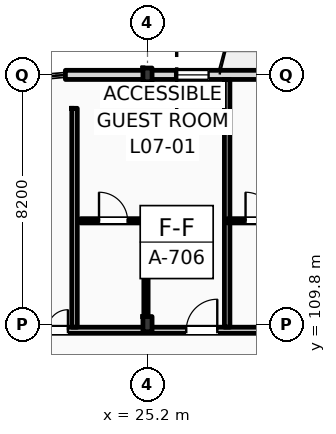
"""IFC4 building model, lengths in metres.
Left out: names, types, materials, properties, quantities, classifications, styles, units other than length and angle.
Written with IfcOpenShell. Run it as: python <this file> out.ifc"""

import sys

from ifc_helpers import new_model, si_unit, direction, frame, frame_2d, origin, origin_2d, place, context, subcontext, project, spatial, rectangle, i_section, extrude, element, fill, save


model = new_model("IFC4")
c1 = context("Model", 3, precision=1e-05, world=origin(), true_north=direction((0.0, 1.0)))
c2 = subcontext(c1, "Body", "Model", "MODEL_VIEW")
j1 = project(units=[si_unit("LENGTHUNIT", "METRE"), si_unit("PLANEANGLEUNIT", "RADIAN")], contexts=[c1])
p1 = place(None, origin())
s1 = spatial("IfcSite", under=j1, at=p1, CompositionType="ELEMENT")
p2 = place(p1, origin())
s2 = spatial("IfcBuilding", under=s1, at=p2, CompositionType="ELEMENT")
p3 = place(p2, frame((0.0, 0.0, 31.8)))
s3 = spatial("IfcBuildingStorey", under=s2, at=p3, CompositionType="ELEMENT", Elevation=31.8)
p4 = place(p3, frame((25.2, 109.8, 0.0), z_axis=(0.0, 0.0, 1.0), x_axis=(1.0, 0.0, 0.0)))
e1 = element("IfcColumn", 1, at=p4, inside=s3, PredefinedType="COLUMN", context=c2, shape_type="SweptSolid", body=[
    extrude(i_section(OverallWidth=0.3, OverallDepth=0.5, WebThickness=0.014, FlangeThickness=0.028, FilletRadius=0.027, at=origin_2d()), origin(), (0.0, 0.0, 1.0), 3.6),
])
p5 = place(p3, frame((25.2, 118.0, 0.0), z_axis=(0.0, 0.0, 1.0), x_axis=(1.0, 0.0, 0.0)))
e2 = element("IfcColumn", 2, at=p5, inside=s3, PredefinedType="COLUMN", context=c2, shape_type="SweptSolid", body=[
    extrude(i_section(OverallWidth=0.3, OverallDepth=0.45, WebThickness=0.014, FlangeThickness=0.026, FilletRadius=0.027, at=origin_2d()), origin(), (0.0, 0.0, 1.0), 3.6),
])
p6 = place(p3, frame((22.5, 118.0, 0.0), z_axis=(0.0, 0.0, 1.0), x_axis=(1.0, 0.0, 0.0)))
e3 = element("IfcWall", 3, at=p6, inside=s3, PredefinedType="STANDARD", context=c2, shape_type="SweptSolid", body=[
    extrude(rectangle(XDim=97.5, YDim=0.3, at=frame_2d((48.75, 0.0))), origin(), (0.0, 0.0, 1.0), 2.72),
])
p7 = place(p6, frame((3.61, 0.0, 0.9)))
e4 = element("IfcOpeningElement", 4, at=p7, cuts=e3, PredefinedType="OPENING", context=c2, shape_type="SweptSolid", body=[
    extrude(rectangle(XDim=1.1, YDim=1.64, at=frame_2d((0.55, 0.82))), frame((0.0, 0.16, 0.0), z_axis=(0.0, -1.0, 0.0), x_axis=(1.0, 0.0, 0.0)), (0.0, 0.0, 1.0), 0.32),
])
p8 = place(p6, frame((6.855, 0.0, 0.0)))
e5 = element("IfcOpeningElement", 5, at=p8, cuts=e3, PredefinedType="OPENING", context=c2, shape_type="SweptSolid", body=[
    extrude(rectangle(XDim=1.2, YDim=2.25, at=frame_2d((0.6, 1.125))), frame((0.0, 0.16, 0.0), z_axis=(0.0, -1.0, 0.0), x_axis=(1.0, 0.0, 0.0)), (0.0, 0.0, 1.0), 0.32),
])
p9 = place(p6, frame((11.405, 0.0, 0.9)))
e6 = element("IfcOpeningElement", 6, at=p9, cuts=e3, PredefinedType="OPENING", context=c2, shape_type="SweptSolid", body=[
    extrude(rectangle(XDim=2.1, YDim=1.64, at=frame_2d((1.05, 0.82))), frame((0.0, 0.16, 0.0), z_axis=(0.0, -1.0, 0.0), x_axis=(1.0, 0.0, 0.0)), (0.0, 0.0, 1.0), 0.32),
])
p10 = place(p6, frame((15.13, 0.0, 0.9)))
e7 = element("IfcOpeningElement", 7, at=p10, cuts=e3, PredefinedType="OPENING", context=c2, shape_type="SweptSolid", body=[
    extrude(rectangle(XDim=2.25, YDim=1.64, at=frame_2d((1.125, 0.82))), frame((0.0, 0.16, 0.0), z_axis=(0.0, -1.0, 0.0), x_axis=(1.0, 0.0, 0.0)), (0.0, 0.0, 1.0), 0.32),
])
p11 = place(p6, frame((21.53, 0.0, 0.0)))
e8 = element("IfcOpeningElement", 8, at=p11, cuts=e3, PredefinedType="OPENING", context=c2, shape_type="SweptSolid", body=[
    extrude(rectangle(XDim=1.2, YDim=2.25, at=frame_2d((0.6, 1.125))), frame((0.0, 0.16, 0.0), z_axis=(0.0, -1.0, 0.0), x_axis=(1.0, 0.0, 0.0)), (0.0, 0.0, 1.0), 0.32),
])
p12 = place(p6, frame((24.18, 0.0, 0.9)))
e9 = element("IfcOpeningElement", 9, at=p12, cuts=e3, PredefinedType="OPENING", context=c2, shape_type="SweptSolid", body=[
    extrude(rectangle(XDim=1.1, YDim=1.64, at=frame_2d((0.55, 0.82))), frame((0.0, 0.16, 0.0), z_axis=(0.0, -1.0, 0.0), x_axis=(1.0, 0.0, 0.0)), (0.0, 0.0, 1.0), 0.32),
])
p13 = place(p6, frame((29.105, 0.0, 0.9)))
e10 = element("IfcOpeningElement", 10, at=p13, cuts=e3, PredefinedType="OPENING", context=c2, shape_type="SweptSolid", body=[
    extrude(rectangle(XDim=2.7, YDim=1.64, at=frame_2d((1.35, 0.82))), frame((0.0, 0.16, 0.0), z_axis=(0.0, -1.0, 0.0), x_axis=(1.0, 0.0, 0.0)), (0.0, 0.0, 1.0), 0.32),
])
p14 = place(p6, frame((34.83, 0.0, 0.9)))
e11 = element("IfcOpeningElement", 11, at=p14, cuts=e3, PredefinedType="OPENING", context=c2, shape_type="SweptSolid", body=[
    extrude(rectangle(XDim=1.8, YDim=1.64, at=frame_2d((0.9, 0.82))), frame((0.0, 0.16, 0.0), z_axis=(0.0, -1.0, 0.0), x_axis=(1.0, 0.0, 0.0)), (0.0, 0.0, 1.0), 0.32),
])
p15 = place(p6, frame((38.525, 0.0, 0.0)))
e12 = element("IfcOpeningElement", 12, at=p15, cuts=e3, PredefinedType="OPENING", context=c2, shape_type="SweptSolid", body=[
    extrude(rectangle(XDim=1.2, YDim=2.25, at=frame_2d((0.6, 1.125))), frame((0.0, 0.16, 0.0), z_axis=(0.0, -1.0, 0.0), x_axis=(1.0, 0.0, 0.0)), (0.0, 0.0, 1.0), 0.32),
])
p16 = place(p6, frame((42.73, 0.0, 0.9)))
e13 = element("IfcOpeningElement", 13, at=p16, cuts=e3, PredefinedType="OPENING", context=c2, shape_type="SweptSolid", body=[
    extrude(rectangle(XDim=3.05, YDim=1.64, at=frame_2d((1.525, 0.82))), frame((0.0, 0.16, 0.0), z_axis=(0.0, -1.0, 0.0), x_axis=(1.0, 0.0, 0.0)), (0.0, 0.0, 1.0), 0.32),
])
p17 = place(p6, frame((47.155, 0.0, 0.9)))
e14 = element("IfcOpeningElement", 14, at=p17, cuts=e3, PredefinedType="OPENING", context=c2, shape_type="SweptSolid", body=[
    extrude(rectangle(XDim=1.35, YDim=1.64, at=frame_2d((0.675, 0.82))), frame((0.0, 0.16, 0.0), z_axis=(0.0, -1.0, 0.0), x_axis=(1.0, 0.0, 0.0)), (0.0, 0.0, 1.0), 0.32),
])
p18 = place(p6, frame((53.065, 0.0, 0.0)))
e15 = element("IfcOpeningElement", 15, at=p18, cuts=e3, PredefinedType="OPENING", context=c2, shape_type="SweptSolid", body=[
    extrude(rectangle(XDim=1.2, YDim=2.25, at=frame_2d((0.6, 1.125))), frame((0.0, 0.16, 0.0), z_axis=(0.0, -1.0, 0.0), x_axis=(1.0, 0.0, 0.0)), (0.0, 0.0, 1.0), 0.32),
])
p19 = place(p6, frame((58.2, 0.0, 0.9)))
e16 = element("IfcOpeningElement", 16, at=p19, cuts=e3, PredefinedType="OPENING", context=c2, shape_type="SweptSolid", body=[
    extrude(rectangle(XDim=1.8, YDim=1.64, at=frame_2d((0.9, 0.82))), frame((0.0, 0.16, 0.0), z_axis=(0.0, -1.0, 0.0), x_axis=(1.0, 0.0, 0.0)), (0.0, 0.0, 1.0), 0.32),
])
p20 = place(p6, frame((61.13, 0.0, 0.9)))
e17 = element("IfcOpeningElement", 17, at=p20, cuts=e3, PredefinedType="OPENING", context=c2, shape_type="SweptSolid", body=[
    extrude(rectangle(XDim=3.05, YDim=1.64, at=frame_2d((1.525, 0.82))), frame((0.0, 0.16, 0.0), z_axis=(0.0, -1.0, 0.0), x_axis=(1.0, 0.0, 0.0)), (0.0, 0.0, 1.0), 0.32),
])
p21 = place(p6, frame((67.93, 0.0, 0.0)))
e18 = element("IfcOpeningElement", 18, at=p21, cuts=e3, PredefinedType="OPENING", context=c2, shape_type="SweptSolid", body=[
    extrude(rectangle(XDim=1.2, YDim=2.25, at=frame_2d((0.6, 1.125))), frame((0.0, 0.16, 0.0), z_axis=(0.0, -1.0, 0.0), x_axis=(1.0, 0.0, 0.0)), (0.0, 0.0, 1.0), 0.32),
])
p22 = place(p6, frame((70.39, 0.0, 0.0)))
e19 = element("IfcOpeningElement", 19, at=p22, cuts=e3, PredefinedType="OPENING", context=c2, shape_type="SweptSolid", body=[
    extrude(rectangle(XDim=1.2, YDim=2.25, at=frame_2d((0.6, 1.125))), frame((0.0, 0.16, 0.0), z_axis=(0.0, -1.0, 0.0), x_axis=(1.0, 0.0, 0.0)), (0.0, 0.0, 1.0), 0.32),
])
p23 = place(p6, frame((75.905, 0.0, 0.9)))
e20 = element("IfcOpeningElement", 20, at=p23, cuts=e3, PredefinedType="OPENING", context=c2, shape_type="SweptSolid", body=[
    extrude(rectangle(XDim=1.1, YDim=1.5, at=frame_2d((0.55, 0.75))), frame((0.0, 0.16, 0.0), z_axis=(0.0, -1.0, 0.0), x_axis=(1.0, 0.0, 0.0)), (0.0, 0.0, 1.0), 0.32),
])
p24 = place(p6, frame((81.63, 0.0, 0.9)))
e21 = element("IfcOpeningElement", 21, at=p24, cuts=e3, PredefinedType="OPENING", context=c2, shape_type="SweptSolid", body=[
    extrude(rectangle(XDim=1.1, YDim=1.6, at=frame_2d((0.55, 0.8))), frame((0.0, 0.16, 0.0), z_axis=(0.0, -1.0, 0.0), x_axis=(1.0, 0.0, 0.0)), (0.0, 0.0, 1.0), 0.32),
])
p25 = place(p6, frame((84.955, 0.0, 0.9)))
e22 = element("IfcOpeningElement", 22, at=p25, cuts=e3, PredefinedType="OPENING", context=c2, shape_type="SweptSolid", body=[
    extrude(rectangle(XDim=1.4, YDim=1.64, at=frame_2d((0.7, 0.82))), frame((0.0, 0.16, 0.0), z_axis=(0.0, -1.0, 0.0), x_axis=(1.0, 0.0, 0.0)), (0.0, 0.0, 1.0), 0.32),
])
p26 = place(p6, frame((90.055, 0.0, 0.9)))
e23 = element("IfcOpeningElement", 23, at=p26, cuts=e3, PredefinedType="OPENING", context=c2, shape_type="SweptSolid", body=[
    extrude(rectangle(XDim=1.6, YDim=1.64, at=frame_2d((0.8, 0.82))), frame((0.0, 0.16, 0.0), z_axis=(0.0, -1.0, 0.0), x_axis=(1.0, 0.0, 0.0)), (0.0, 0.0, 1.0), 0.32),
])
p27 = place(p6, frame((93.87, 0.0, 0.9)))
e24 = element("IfcOpeningElement", 24, at=p27, cuts=e3, PredefinedType="OPENING", context=c2, shape_type="SweptSolid", body=[
    extrude(rectangle(XDim=1.75, YDim=1.64, at=frame_2d((0.875, 0.82))), frame((0.0, 0.16, 0.0), z_axis=(0.0, -1.0, 0.0), x_axis=(1.0, 0.0, 0.0)), (0.0, 0.0, 1.0), 0.32),
])
p28 = place(p3, frame((10.65, 109.6, 0.0), z_axis=(0.0, 0.0, 1.0), x_axis=(1.0, 0.0, 0.0)))
e25 = element("IfcWall", 25, at=p28, inside=s3, PredefinedType="PARTITIONING", context=c2, shape_type="SweptSolid", body=[
    extrude(rectangle(XDim=109.21, YDim=0.2, at=frame_2d((54.605, 0.0))), origin(), (0.0, 0.0, 1.0), 2.72),
])
p29 = place(p28, frame((15.825, 0.0, 0.0)))
e26 = element("IfcOpeningElement", 26, at=p29, cuts=e25, PredefinedType="OPENING", context=c2, shape_type="SweptSolid", body=[
    extrude(rectangle(XDim=1.02, YDim=2.2, at=frame_2d((0.51, 1.1))), frame((0.0, 0.11, 0.0), z_axis=(0.0, -1.0, 0.0), x_axis=(1.0, 0.0, 0.0)), (0.0, 0.0, 1.0), 0.22),
])
p30 = place(p28, frame((19.87, 0.0, 0.0)))
e27 = element("IfcOpeningElement", 27, at=p30, cuts=e25, PredefinedType="OPENING", context=c2, shape_type="SweptSolid", body=[
    extrude(rectangle(XDim=1.02, YDim=2.2, at=frame_2d((0.51, 1.1))), frame((0.0, 0.11, 0.0), z_axis=(0.0, -1.0, 0.0), x_axis=(1.0, 0.0, 0.0)), (0.0, 0.0, 1.0), 0.22),
])
p31 = place(p28, frame((24.47, 0.0, 0.0)))
e28 = element("IfcOpeningElement", 28, at=p31, cuts=e25, PredefinedType="OPENING", context=c2, shape_type="SweptSolid", body=[
    extrude(rectangle(XDim=1.02, YDim=2.2, at=frame_2d((0.51, 1.1))), frame((0.0, 0.11, 0.0), z_axis=(0.0, -1.0, 0.0), x_axis=(1.0, 0.0, 0.0)), (0.0, 0.0, 1.0), 0.22),
])
p32 = place(p28, frame((26.92, 0.0, 0.0)))
e29 = element("IfcOpeningElement", 29, at=p32, cuts=e25, PredefinedType="OPENING", context=c2, shape_type="SweptSolid", body=[
    extrude(rectangle(XDim=1.02, YDim=2.2, at=frame_2d((0.51, 1.1))), frame((0.0, 0.11, 0.0), z_axis=(0.0, -1.0, 0.0), x_axis=(1.0, 0.0, 0.0)), (0.0, 0.0, 1.0), 0.22),
])
p33 = place(p28, frame((33.7, 0.0, 0.0)))
e30 = element("IfcOpeningElement", 30, at=p33, cuts=e25, PredefinedType="OPENING", context=c2, shape_type="SweptSolid", body=[
    extrude(rectangle(XDim=0.96, YDim=2.2, at=frame_2d((0.48, 1.1))), frame((0.0, 0.11, 0.0), z_axis=(0.0, -1.0, 0.0), x_axis=(1.0, 0.0, 0.0)), (0.0, 0.0, 1.0), 0.22),
])
p34 = place(p28, frame((35.9, 0.0, 0.0)))
e31 = element("IfcOpeningElement", 31, at=p34, cuts=e25, PredefinedType="OPENING", context=c2, shape_type="SweptSolid", body=[
    extrude(rectangle(XDim=0.96, YDim=2.2, at=frame_2d((0.48, 1.1))), frame((0.0, 0.11, 0.0), z_axis=(0.0, -1.0, 0.0), x_axis=(1.0, 0.0, 0.0)), (0.0, 0.0, 1.0), 0.22),
])
p35 = place(p28, frame((42.9, 0.0, 0.0)))
e32 = element("IfcOpeningElement", 32, at=p35, cuts=e25, PredefinedType="OPENING", context=c2, shape_type="SweptSolid", body=[
    extrude(rectangle(XDim=0.96, YDim=2.2, at=frame_2d((0.48, 1.1))), frame((0.0, 0.11, 0.0), z_axis=(0.0, -1.0, 0.0), x_axis=(1.0, 0.0, 0.0)), (0.0, 0.0, 1.0), 0.22),
])
p36 = place(p28, frame((47.5, 0.0, 0.0)))
e33 = element("IfcOpeningElement", 33, at=p36, cuts=e25, PredefinedType="OPENING", context=c2, shape_type="SweptSolid", body=[
    extrude(rectangle(XDim=0.96, YDim=2.2, at=frame_2d((0.48, 1.1))), frame((0.0, 0.11, 0.0), z_axis=(0.0, -1.0, 0.0), x_axis=(1.0, 0.0, 0.0)), (0.0, 0.0, 1.0), 0.22),
])
p37 = place(p28, frame((49.95, 0.0, 0.0)))
e34 = element("IfcOpeningElement", 34, at=p37, cuts=e25, PredefinedType="OPENING", context=c2, shape_type="SweptSolid", body=[
    extrude(rectangle(XDim=0.96, YDim=2.2, at=frame_2d((0.48, 1.1))), frame((0.0, 0.11, 0.0), z_axis=(0.0, -1.0, 0.0), x_axis=(1.0, 0.0, 0.0)), (0.0, 0.0, 1.0), 0.22),
])
p38 = place(p28, frame((56.7, 0.0, 0.0)))
e35 = element("IfcOpeningElement", 35, at=p38, cuts=e25, PredefinedType="OPENING", context=c2, shape_type="SweptSolid", body=[
    extrude(rectangle(XDim=0.96, YDim=2.2, at=frame_2d((0.48, 1.1))), frame((0.0, 0.11, 0.0), z_axis=(0.0, -1.0, 0.0), x_axis=(1.0, 0.0, 0.0)), (0.0, 0.0, 1.0), 0.22),
])
p39 = place(p28, frame((59.15, 0.0, 0.0)))
e36 = element("IfcOpeningElement", 36, at=p39, cuts=e25, PredefinedType="OPENING", context=c2, shape_type="SweptSolid", body=[
    extrude(rectangle(XDim=0.96, YDim=2.2, at=frame_2d((0.48, 1.1))), frame((0.0, 0.11, 0.0), z_axis=(0.0, -1.0, 0.0), x_axis=(1.0, 0.0, 0.0)), (0.0, 0.0, 1.0), 0.22),
])
p40 = place(p28, frame((65.9, 0.0, 0.0)))
e37 = element("IfcOpeningElement", 37, at=p40, cuts=e25, PredefinedType="OPENING", context=c2, shape_type="SweptSolid", body=[
    extrude(rectangle(XDim=0.96, YDim=2.2, at=frame_2d((0.48, 1.1))), frame((0.0, 0.11, 0.0), z_axis=(0.0, -1.0, 0.0), x_axis=(1.0, 0.0, 0.0)), (0.0, 0.0, 1.0), 0.22),
])
p41 = place(p28, frame((70.5, 0.0, 0.0)))
e38 = element("IfcOpeningElement", 38, at=p41, cuts=e25, PredefinedType="OPENING", context=c2, shape_type="SweptSolid", body=[
    extrude(rectangle(XDim=0.96, YDim=2.2, at=frame_2d((0.48, 1.1))), frame((0.0, 0.11, 0.0), z_axis=(0.0, -1.0, 0.0), x_axis=(1.0, 0.0, 0.0)), (0.0, 0.0, 1.0), 0.22),
])
p42 = place(p28, frame((72.95, 0.0, 0.0)))
e39 = element("IfcOpeningElement", 39, at=p42, cuts=e25, PredefinedType="OPENING", context=c2, shape_type="SweptSolid", body=[
    extrude(rectangle(XDim=0.96, YDim=2.2, at=frame_2d((0.48, 1.1))), frame((0.0, 0.11, 0.0), z_axis=(0.0, -1.0, 0.0), x_axis=(1.0, 0.0, 0.0)), (0.0, 0.0, 1.0), 0.22),
])
p43 = place(p28, frame((79.7, 0.0, 0.0)))
e40 = element("IfcOpeningElement", 40, at=p43, cuts=e25, PredefinedType="OPENING", context=c2, shape_type="SweptSolid", body=[
    extrude(rectangle(XDim=0.96, YDim=2.2, at=frame_2d((0.48, 1.1))), frame((0.0, 0.11, 0.0), z_axis=(0.0, -1.0, 0.0), x_axis=(1.0, 0.0, 0.0)), (0.0, 0.0, 1.0), 0.22),
])
p44 = place(p28, frame((82.15, 0.0, 0.0)))
e41 = element("IfcOpeningElement", 41, at=p44, cuts=e25, PredefinedType="OPENING", context=c2, shape_type="SweptSolid", body=[
    extrude(rectangle(XDim=0.96, YDim=2.2, at=frame_2d((0.48, 1.1))), frame((0.0, 0.11, 0.0), z_axis=(0.0, -1.0, 0.0), x_axis=(1.0, 0.0, 0.0)), (0.0, 0.0, 1.0), 0.22),
])
p45 = place(p28, frame((88.9, 0.0, 0.0)))
e42 = element("IfcOpeningElement", 42, at=p45, cuts=e25, PredefinedType="OPENING", context=c2, shape_type="SweptSolid", body=[
    extrude(rectangle(XDim=0.96, YDim=2.2, at=frame_2d((0.48, 1.1))), frame((0.0, 0.11, 0.0), z_axis=(0.0, -1.0, 0.0), x_axis=(1.0, 0.0, 0.0)), (0.0, 0.0, 1.0), 0.22),
])
p46 = place(p28, frame((93.75, 0.0, 0.0)))
e43 = element("IfcOpeningElement", 43, at=p46, cuts=e25, PredefinedType="OPENING", context=c2, shape_type="SweptSolid", body=[
    extrude(rectangle(XDim=0.96, YDim=2.2, at=frame_2d((0.48, 1.1))), frame((0.0, 0.11, 0.0), z_axis=(0.0, -1.0, 0.0), x_axis=(1.0, 0.0, 0.0)), (0.0, 0.0, 1.0), 0.22),
])
p47 = place(p28, frame((98.1, 0.0, 0.0)))
e44 = element("IfcOpeningElement", 44, at=p47, cuts=e25, PredefinedType="OPENING", context=c2, shape_type="SweptSolid", body=[
    extrude(rectangle(XDim=0.96, YDim=2.2, at=frame_2d((0.48, 1.1))), frame((0.0, 0.11, 0.0), z_axis=(0.0, -1.0, 0.0), x_axis=(1.0, 0.0, 0.0)), (0.0, 0.0, 1.0), 0.22),
])
p48 = place(p28, frame((102.7, 0.0, 0.0)))
e45 = element("IfcOpeningElement", 45, at=p48, cuts=e25, PredefinedType="OPENING", context=c2, shape_type="SweptSolid", body=[
    extrude(rectangle(XDim=0.96, YDim=2.2, at=frame_2d((0.48, 1.1))), frame((0.0, 0.11, 0.0), z_axis=(0.0, -1.0, 0.0), x_axis=(1.0, 0.0, 0.0)), (0.0, 0.0, 1.0), 0.22),
])
p49 = place(p28, frame((105.04, 0.0, 0.0)))
e46 = element("IfcOpeningElement", 46, at=p49, cuts=e25, PredefinedType="OPENING", context=c2, shape_type="SweptSolid", body=[
    extrude(rectangle(XDim=0.96, YDim=2.2, at=frame_2d((0.48, 1.1))), frame((0.0, 0.11, 0.0), z_axis=(0.0, -1.0, 0.0), x_axis=(1.0, 0.0, 0.0)), (0.0, 0.0, 1.0), 0.22),
])
p50 = place(p28, frame((2.716, 0.0, 0.0)))
e47 = element("IfcOpeningElement", 47, at=p50, cuts=e25, PredefinedType="OPENING", context=c2, shape_type="SweptSolid", body=[
    extrude(rectangle(XDim=1.35, YDim=2.25, at=frame_2d((0.675, 1.125))), frame((0.0, 0.11, 0.0), z_axis=(0.0, -1.0, 0.0), x_axis=(1.0, 0.0, 0.0)), (0.0, 0.0, 1.0), 0.22),
])
p51 = place(p28, frame((6.65, 0.0, 0.0)))
e48 = element("IfcOpeningElement", 48, at=p51, cuts=e25, PredefinedType="OPENING", context=c2, shape_type="SweptSolid", body=[
    extrude(rectangle(XDim=1.35, YDim=2.25, at=frame_2d((0.675, 1.125))), frame((0.0, 0.11, 0.0), z_axis=(0.0, -1.0, 0.0), x_axis=(1.0, 0.0, 0.0)), (0.0, 0.0, 1.0), 0.22),
])
p52 = place(p28, frame((10.583, 0.0, 0.0)))
e49 = element("IfcOpeningElement", 49, at=p52, cuts=e25, PredefinedType="OPENING", context=c2, shape_type="SweptSolid", body=[
    extrude(rectangle(XDim=1.35, YDim=2.25, at=frame_2d((0.675, 1.125))), frame((0.0, 0.11, 0.0), z_axis=(0.0, -1.0, 0.0), x_axis=(1.0, 0.0, 0.0)), (0.0, 0.0, 1.0), 0.22),
])
p53 = place(p3, frame((27.82, 109.7, 0.0), z_axis=(0.0, 0.0, 1.0), x_axis=(0.0, 1.0, 0.0)))
e50 = element("IfcWall", 50, at=p53, inside=s3, PredefinedType="PARTITIONING", context=c2, shape_type="SweptSolid", body=[
    extrude(rectangle(XDim=8.15, YDim=0.18, at=frame_2d((4.075, 0.0))), origin(), (0.0, 0.0, 1.0), 3.05),
])
p54 = place(p3, frame((25.15, 109.7, 0.0), z_axis=(0.0, 0.0, 1.0), x_axis=(0.0, 1.0, 0.0)))
e51 = element("IfcWall", 51, at=p54, inside=s3, PredefinedType="PARTITIONING", context=c2, shape_type="SweptSolid", body=[
    extrude(rectangle(XDim=3.5, YDim=0.14, at=frame_2d((1.75, 0.0))), origin(), (0.0, 0.0, 1.0), 2.99),
])
p55 = place(p3, frame((23.0, 113.2, 0.0), z_axis=(0.0, 0.0, 1.0), x_axis=(1.0, 0.0, 0.0)))
e52 = element("IfcWall", 52, at=p55, inside=s3, PredefinedType="PARTITIONING", context=c2, shape_type="SweptSolid", body=[
    extrude(rectangle(XDim=2.15, YDim=0.14, at=frame_2d((1.075, 0.0))), origin(), (0.0, 0.0, 1.0), 3.36),
])
p56 = place(p55, frame((0.605, 0.0, 0.0)))
e53 = element("IfcOpeningElement", 53, at=p56, cuts=e52, PredefinedType="OPENING", context=c2, shape_type="SweptSolid", body=[
    extrude(rectangle(XDim=0.94, YDim=2.15, at=frame_2d((0.47, 1.075))), frame((0.0, 0.08, 0.0), z_axis=(0.0, -1.0, 0.0), x_axis=(1.0, 0.0, 0.0)), (0.0, 0.0, 1.0), 0.16),
])
p57 = place(p3, frame((27.82, 113.2, 0.0), z_axis=(0.0, 0.0, 1.0), x_axis=(1.0, 0.0, 0.0)))
e54 = element("IfcWall", 54, at=p57, inside=s3, PredefinedType="PARTITIONING", context=c2, shape_type="SweptSolid", body=[
    extrude(rectangle(XDim=2.15, YDim=0.14, at=frame_2d((1.075, 0.0))), origin(), (0.0, 0.0, 1.0), 3.36),
])
p58 = place(p57, frame((0.605, 0.0, 0.0)))
e55 = element("IfcOpeningElement", 55, at=p58, cuts=e54, PredefinedType="OPENING", context=c2, shape_type="SweptSolid", body=[
    extrude(rectangle(XDim=0.94, YDim=2.15, at=frame_2d((0.47, 1.075))), frame((0.0, 0.08, 0.0), z_axis=(0.0, -1.0, 0.0), x_axis=(1.0, 0.0, 0.0)), (0.0, 0.0, 1.0), 0.16),
])
p59 = place(p3, frame((22.8, 109.7, 0.0), z_axis=(0.0, 0.0, 1.0), x_axis=(0.0, 1.0, 0.0)))
e56 = element("IfcWall", 56, at=p59, inside=s3, PredefinedType="PARTITIONING", context=c2, shape_type="SweptSolid", body=[
    extrude(rectangle(XDim=7.2, YDim=0.18, at=frame_2d((3.6, 0.0))), origin(), (0.0, 0.0, 1.0), 3.36),
])
p60 = place(p7, origin())
e57 = element("IfcWindow", 57, at=p60, inside=s3, PartitioningType="DOUBLE_PANEL_VERTICAL", PredefinedType="WINDOW", context=c2, shape_type="SweptSolid", body=[
    extrude(rectangle(XDim=1.1, YDim=1.64, at=frame_2d((0.55, 0.82))), frame((0.0, 0.03, 0.0), z_axis=(0.0, -1.0, 0.0), x_axis=(1.0, 0.0, 0.0)), (0.0, 0.0, 1.0), 0.06),
])
fill(e4, e57)
p61 = place(p29, origin())
e58 = element("IfcDoor", 58, at=p61, inside=s3, OperationType="SINGLE_SWING_RIGHT", PredefinedType="DOOR", context=c2, shape_type="SweptSolid", body=[
    extrude(rectangle(XDim=1.02, YDim=2.2, at=frame_2d((0.51, 1.1))), frame((0.0, 0.025, 0.0), z_axis=(0.0, -1.0, 0.0), x_axis=(1.0, 0.0, 0.0)), (0.0, 0.0, 1.0), 0.05),
])
fill(e26, e58)
p62 = place(p56, origin())
e59 = element("IfcDoor", 59, at=p62, inside=s3, OperationType="SINGLE_SWING_LEFT", PredefinedType="DOOR", context=c2, shape_type="SweptSolid", body=[
    extrude(rectangle(XDim=0.94, YDim=2.15, at=frame_2d((0.47, 1.075))), frame((0.0, 0.025, 0.0), z_axis=(0.0, -1.0, 0.0), x_axis=(1.0, 0.0, 0.0)), (0.0, 0.0, 1.0), 0.05),
])
fill(e53, e59)
p63 = place(p58, origin())
e60 = element("IfcDoor", 60, at=p63, inside=s3, OperationType="SINGLE_SWING_LEFT", PredefinedType="DOOR", context=c2, shape_type="SweptSolid", body=[
    extrude(rectangle(XDim=0.94, YDim=2.15, at=frame_2d((0.47, 1.075))), frame((0.0, 0.025, 0.0), z_axis=(0.0, -1.0, 0.0), x_axis=(1.0, 0.0, 0.0)), (0.0, 0.0, 1.0), 0.05),
])
fill(e55, e60)
p64 = place(p52, origin())
e61 = element("IfcDoor", 61, at=p64, inside=s3, OperationType="DOUBLE_SWING_LEFT", PredefinedType="DOOR", context=c2, shape_type="SweptSolid", body=[
    extrude(rectangle(XDim=1.35, YDim=2.25, at=frame_2d((0.675, 1.125))), frame((0.0, 0.025, 0.0), z_axis=(0.0, -1.0, 0.0), x_axis=(1.0, 0.0, 0.0)), (0.0, 0.0, 1.0), 0.05),
])
fill(e49, e61)
save(model, sys.argv[1])
